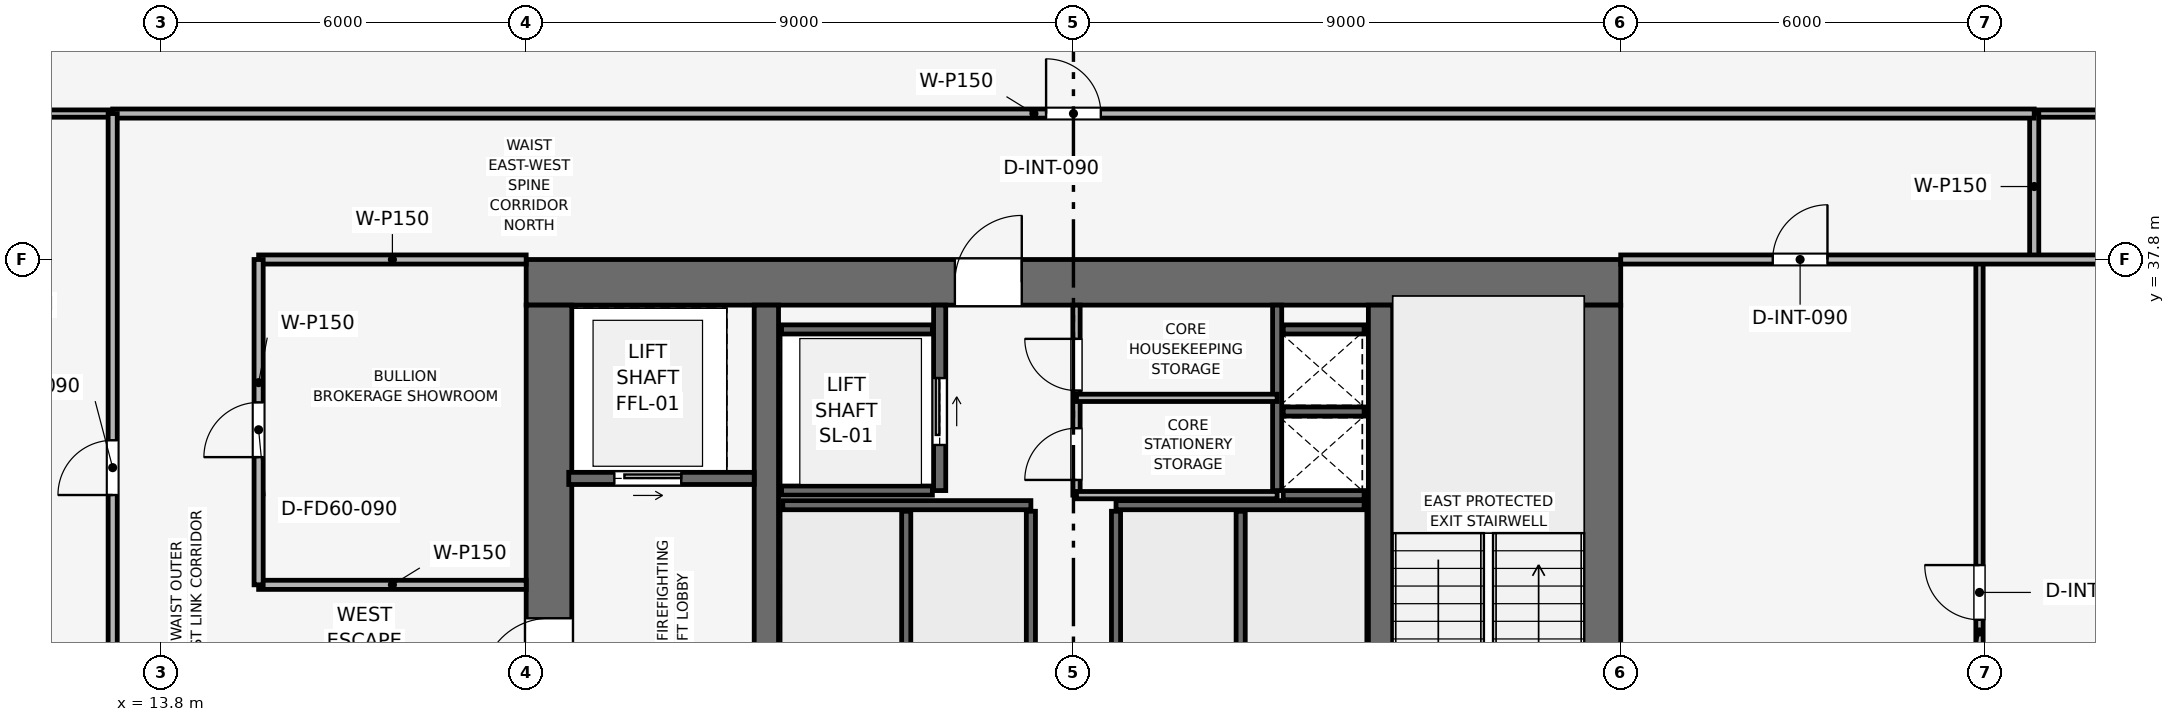
"""IFC4 building model, lengths in metres.
Left out: names, types, materials, properties, quantities, classifications, styles, units other than length and angle.
Written with IfcOpenShell. Run it as: python <this file> out.ifc"""

import sys

from ifc_helpers import new_model, si_unit, direction, frame, frame_2d, origin, place, context, subcontext, project, spatial, rectangle, extrude, element, fill, save


model = new_model("IFC4")
c1 = context("Model", 3, precision=1e-05, world=origin(), true_north=direction((0.0, 1.0)))
c2 = subcontext(c1, "Body", "Model", "MODEL_VIEW")
j1 = project(units=[si_unit("LENGTHUNIT", "METRE"), si_unit("PLANEANGLEUNIT", "RADIAN")], contexts=[c1])
p1 = place(None, origin())
s1 = spatial("IfcSite", under=j1, at=p1, CompositionType="ELEMENT")
p2 = place(p1, origin())
s2 = spatial("IfcBuilding", under=s1, at=p2, CompositionType="ELEMENT")
p3 = place(p2, frame((0.0, 0.0, 199.95)))
s3 = spatial("IfcBuildingStorey", under=s2, at=p3, CompositionType="ELEMENT", Elevation=199.95)
p4 = place(p3, frame((19.8, 37.425, 0.0), z_axis=(0.0, 0.0, 1.0), x_axis=(1.0, 0.0, 0.0)))
e1 = element("IfcWall", 1, at=p4, inside=s3, PredefinedType="SHEAR", context=c2, shape_type="SweptSolid", body=[
    extrude(rectangle(XDim=18.0, YDim=0.75, at=frame_2d((9.0, 0.0))), origin(), (0.0, 0.0, 1.0), 3.75),
])
p5 = place(p4, frame((7.05, 0.0, 0.0)))
e2 = element("IfcOpeningElement", 2, at=p5, cuts=e1, PredefinedType="OPENING", context=c2, shape_type="SweptSolid", body=[
    extrude(rectangle(XDim=1.1, YDim=2.15, at=frame_2d((0.55, 1.075))), frame((0.0, 0.385, 0.0), z_axis=(0.0, -1.0, 0.0), x_axis=(1.0, 0.0, 0.0)), (0.0, 0.0, 1.0), 0.77),
])
p6 = place(p3, frame((20.175, 20.55, 0.0), z_axis=(0.0, 0.0, 1.0), x_axis=(0.0, 1.0, 0.0)))
e3 = element("IfcWall", 3, at=p6, inside=s3, PredefinedType="SHEAR", context=c2, shape_type="SweptSolid", body=[
    extrude(rectangle(XDim=16.5, YDim=0.75, at=frame_2d((8.25, 0.0))), origin(), (0.0, 0.0, 1.0), 3.75),
])
p7 = place(p6, frame((10.25, 0.0, 0.0)))
e4 = element("IfcOpeningElement", 4, at=p7, cuts=e3, PredefinedType="OPENING", context=c2, shape_type="SweptSolid", body=[
    extrude(rectangle(XDim=1.1, YDim=2.15, at=frame_2d((0.55, 1.075))), frame((0.0, 0.385, 0.0), z_axis=(0.0, -1.0, 0.0), x_axis=(1.0, 0.0, 0.0)), (0.0, 0.0, 1.0), 0.77),
])
p8 = place(p3, frame((37.425, 20.55, 0.0), z_axis=(0.0, 0.0, 1.0), x_axis=(0.0, 1.0, 0.0)))
e5 = element("IfcWall", 5, at=p8, inside=s3, PredefinedType="SHEAR", context=c2, shape_type="SweptSolid", body=[
    extrude(rectangle(XDim=16.5, YDim=0.75, at=frame_2d((8.25, 0.0))), origin(), (0.0, 0.0, 1.0), 3.75),
])
p9 = place(p8, frame((4.75, 0.0, 0.0)))
e6 = element("IfcOpeningElement", 6, at=p9, cuts=e5, PredefinedType="OPENING", context=c2, shape_type="SweptSolid", body=[
    extrude(rectangle(XDim=1.1, YDim=2.15, at=frame_2d((0.55, 1.075))), frame((0.0, 0.385, 0.0), z_axis=(0.0, -1.0, 0.0), x_axis=(1.0, 0.0, 0.0)), (0.0, 0.0, 1.0), 0.77),
])
for number, where, z_axis, x_axis in (
    (7, (23.75, 20.55, 0.0), (0.0, 0.0, 1.0), (0.0, 1.0, 0.0)),
    (8, (33.85, 20.55, 0.0), (0.0, 0.0, 1.0), (0.0, 1.0, 0.0)),
):
    element("IfcWall", number, at=place(p3, frame(where, z_axis=z_axis, x_axis=x_axis)), inside=s3, PredefinedType="SHEAR", context=c2, shape_type="SweptSolid", body=[
        extrude(rectangle(XDim=16.5, YDim=0.4, at=frame_2d((8.25, 0.0))), origin(), (0.0, 0.0, 1.0), 3.75),
    ])
p10 = place(p3, frame((32.15, 34.0, 0.0), z_axis=(0.0, 0.0, 1.0), x_axis=(0.0, 1.0, 0.0)))
e9 = element("IfcWall", 9, at=p10, inside=s3, PredefinedType="SHEAR", context=c2, shape_type="SweptSolid", body=[
    extrude(rectangle(XDim=3.05, YDim=0.15, at=frame_2d((1.525, 0.0))), origin(), (0.0, 0.0, 1.0), 3.5),
])
for number, where, z_axis, x_axis in (
    (10, (32.25, 33.925, 0.0), (0.0, 0.0, 1.0), (1.0, 0.0, 0.0)),
    (11, (32.25, 35.3, 0.0), (0.0, 0.0, 1.0), (1.0, 0.0, 0.0)),
):
    element("IfcWall", number, at=place(p3, frame(where, z_axis=z_axis, x_axis=x_axis)), inside=s3, PredefinedType="SHEAR", context=c2, shape_type="SweptSolid", body=[
        extrude(rectangle(XDim=1.33, YDim=0.15, at=frame_2d((0.665, 0.0))), origin(), (0.0, 0.0, 1.0), 3.5),
    ])
p11 = place(p3, frame((20.5, 34.2, 0.0), z_axis=(0.0, 0.0, 1.0), x_axis=(1.0, 0.0, 0.0)))
e12 = element("IfcWall", 12, at=p11, inside=s3, PredefinedType="SHEAR", context=c2, shape_type="SweptSolid", body=[
    extrude(rectangle(XDim=3.05, YDim=0.2, at=frame_2d((1.525, 0.0))), origin(), (0.0, 0.0, 1.0), 3.5),
])
p12 = place(p11, frame((0.75, 0.0, 0.0)))
e13 = element("IfcOpeningElement", 13, at=p12, cuts=e12, PredefinedType="OPENING", context=c2, shape_type="SweptSolid", body=[
    extrude(rectangle(XDim=1.1, YDim=2.15, at=frame_2d((0.55, 1.075))), frame((0.0, 0.11, 0.0), z_axis=(0.0, -1.0, 0.0), x_axis=(1.0, 0.0, 0.0)), (0.0, 0.0, 1.0), 0.22),
])
p13 = place(p3, frame((26.6, 34.0, 0.0), z_axis=(0.0, 0.0, 1.0), x_axis=(0.0, 1.0, 0.0)))
e14 = element("IfcWall", 14, at=p13, inside=s3, PredefinedType="SHEAR", context=c2, shape_type="SweptSolid", body=[
    extrude(rectangle(XDim=3.05, YDim=0.2, at=frame_2d((1.525, 0.0))), origin(), (0.0, 0.0, 1.0), 3.5),
])
p14 = place(p13, frame((0.75, 0.0, 0.0)))
e15 = element("IfcOpeningElement", 15, at=p14, cuts=e14, PredefinedType="OPENING", context=c2, shape_type="SweptSolid", body=[
    extrude(rectangle(XDim=1.1, YDim=2.15, at=frame_2d((0.55, 1.075))), frame((0.0, 0.11, 0.0), z_axis=(0.0, -1.0, 0.0), x_axis=(1.0, 0.0, 0.0)), (0.0, 0.0, 1.0), 0.22),
])
for number, where, z_axis, x_axis in (
    (16, (24.0, 34.0, 0.0), (0.0, 0.0, 1.0), (1.0, 0.0, 0.0)),
    (17, (24.0, 36.65, 0.0), (0.0, 0.0, 1.0), (1.0, 0.0, 0.0)),
):
    element("IfcWall", number, at=place(p3, frame(where, z_axis=z_axis, x_axis=x_axis)), inside=s3, PredefinedType="SHEAR", context=c2, shape_type="SweptSolid", body=[
        extrude(rectangle(XDim=2.48, YDim=0.15, at=frame_2d((1.24, 0.0))), origin(), (0.0, 0.0, 1.0), 3.5),
    ])
p15 = place(p3, frame((32.25, 36.65, 0.0), z_axis=(0.0, 0.0, 1.0), x_axis=(1.0, 0.0, 0.0)))
e18 = element("IfcWall", 18, at=p15, inside=s3, PredefinedType="SHEAR", context=c2, shape_type="SweptSolid", body=[
    extrude(rectangle(XDim=1.33, YDim=0.15, at=frame_2d((0.665, 0.0))), origin(), (0.0, 0.0, 1.0), 3.5),
])
for number, where, z_axis, x_axis in (
    (19, (24.02, 33.76, 0.0), (0.0, 0.0, 1.0), (1.0, 0.0, 0.0)),
    (20, (29.5, 33.76, 0.0), (0.0, 0.0, 1.0), (1.0, 0.0, 0.0)),
):
    element("IfcWall", number, at=place(p3, frame(where, z_axis=z_axis, x_axis=x_axis)), inside=s3, PredefinedType="SHEAR", context=c2, shape_type="SweptSolid", body=[
        extrude(rectangle(XDim=4.08, YDim=0.15, at=frame_2d((2.04, 0.0))), origin(), (0.0, 0.0, 1.0), 3.5),
    ])
for number, where, z_axis, x_axis in (
    (21, (26.05, 31.42, 0.0), (0.0, 0.0, 1.0), (0.0, 1.0, 0.0)),
    (22, (28.1, 31.42, 0.0), (0.0, 0.0, 1.0), (0.0, 1.0, 0.0)),
    (23, (29.5, 31.42, 0.0), (0.0, 0.0, 1.0), (0.0, 1.0, 0.0)),
    (24, (31.55, 31.42, 0.0), (0.0, 0.0, 1.0), (0.0, 1.0, 0.0)),
):
    element("IfcWall", number, at=place(p3, frame(where, z_axis=z_axis, x_axis=x_axis)), inside=s3, PredefinedType="SHEAR", context=c2, shape_type="SweptSolid", body=[
        extrude(rectangle(XDim=2.24, YDim=0.15, at=frame_2d((1.12, 0.0))), origin(), (0.0, 0.0, 1.0), 3.5),
    ])
p16 = place(p3, frame((28.85, 33.925, 0.0), z_axis=(0.0, 0.0, 1.0), x_axis=(0.0, 1.0, 0.0)))
e25 = element("IfcWall", 25, at=p16, inside=s3, PredefinedType="PARTITIONING", context=c2, shape_type="SweptSolid", body=[
    extrude(rectangle(XDim=3.125, YDim=0.12, at=frame_2d((1.562, 0.0))), origin(), (0.0, 0.0, 1.0), 3.5),
])
p17 = place(p16, frame((0.25, 0.0, 0.0)))
e26 = element("IfcOpeningElement", 26, at=p17, cuts=e25, PredefinedType="OPENING", context=c2, shape_type="SweptSolid", body=[
    extrude(rectangle(XDim=0.85, YDim=2.1, at=frame_2d((0.425, 1.05))), frame((0.0, 0.07, 0.0), z_axis=(0.0, -1.0, 0.0), x_axis=(1.0, 0.0, 0.0)), (0.0, 0.0, 1.0), 0.14),
])
p18 = place(p16, frame((1.72, 0.0, 0.0)))
e27 = element("IfcOpeningElement", 27, at=p18, cuts=e25, PredefinedType="OPENING", context=c2, shape_type="SweptSolid", body=[
    extrude(rectangle(XDim=0.85, YDim=2.1, at=frame_2d((0.425, 1.05))), frame((0.0, 0.07, 0.0), z_axis=(0.0, -1.0, 0.0), x_axis=(1.0, 0.0, 0.0)), (0.0, 0.0, 1.0), 0.14),
])
for number, where, z_axis, x_axis in (
    (28, (28.85, 35.525, 0.0), (0.0, 0.0, 1.0), (1.0, 0.0, 0.0)),
    (29, (28.85, 33.925, 0.0), (0.0, 0.0, 1.0), (1.0, 0.0, 0.0)),
):
    element("IfcWall", number, at=place(p3, frame(where, z_axis=z_axis, x_axis=x_axis)), inside=s3, PredefinedType="PARTITIONING", context=c2, shape_type="SweptSolid", body=[
        extrude(rectangle(XDim=3.3, YDim=0.12, at=frame_2d((1.65, 0.0))), origin(), (0.0, 0.0, 1.0), 3.5),
    ])
p19 = place(p3, frame((15.4, 32.45, 0.0), z_axis=(0.0, 0.0, 1.0), x_axis=(1.0, 0.0, 0.0)))
e30 = element("IfcWall", 30, at=p19, inside=s3, PredefinedType="PARTITIONING", context=c2, shape_type="SweptSolid", body=[
    extrude(rectangle(XDim=4.4, YDim=0.15, at=frame_2d((2.2, 0.0))), origin(), (0.0, 0.0, 1.0), 3.5),
])
p20 = place(p3, frame((15.4, 37.8, 0.0), z_axis=(0.0, 0.0, 1.0), x_axis=(1.0, 0.0, 0.0)))
e31 = element("IfcWall", 31, at=p20, inside=s3, PredefinedType="PARTITIONING", context=c2, shape_type="SweptSolid", body=[
    extrude(rectangle(XDim=4.4, YDim=0.15, at=frame_2d((2.2, 0.0))), origin(), (0.0, 0.0, 1.0), 3.035),
])
p21 = place(p3, frame((15.4, 32.45, 0.0), z_axis=(0.0, 0.0, 1.0), x_axis=(0.0, 1.0, 0.0)))
e32 = element("IfcWall", 32, at=p21, inside=s3, PredefinedType="PARTITIONING", context=c2, shape_type="SweptSolid", body=[
    extrude(rectangle(XDim=5.35, YDim=0.15, at=frame_2d((2.675, 0.0))), origin(), (0.0, 0.0, 1.0), 3.035),
])
p22 = place(p21, frame((2.1, 0.0, 0.0)))
e33 = element("IfcOpeningElement", 33, at=p22, cuts=e32, PredefinedType="OPENING", context=c2, shape_type="SweptSolid", body=[
    extrude(rectangle(XDim=0.9, YDim=2.1, at=frame_2d((0.45, 1.05))), frame((0.0, 0.085, 0.0), z_axis=(0.0, -1.0, 0.0), x_axis=(1.0, 0.0, 0.0)), (0.0, 0.0, 1.0), 0.17),
])
p23 = place(p3, frame((43.7, 26.85, 0.0), z_axis=(0.0, 0.0, 1.0), x_axis=(0.0, 1.0, 0.0)))
e34 = element("IfcWall", 34, at=p23, inside=s3, PredefinedType="PARTITIONING", context=c2, shape_type="SweptSolid", body=[
    extrude(rectangle(XDim=10.95, YDim=0.12, at=frame_2d((5.475, 0.0))), origin(), (0.0, 0.0, 1.0), 3.035),
])
p24 = place(p23, frame((5.025, 0.0, 0.0)))
e35 = element("IfcOpeningElement", 35, at=p24, cuts=e34, PredefinedType="OPENING", context=c2, shape_type="SweptSolid", body=[
    extrude(rectangle(XDim=0.9, YDim=2.1, at=frame_2d((0.45, 1.05))), frame((0.0, 0.07, 0.0), z_axis=(0.0, -1.0, 0.0), x_axis=(1.0, 0.0, 0.0)), (0.0, 0.0, 1.0), 0.14),
])
p25 = place(p3, frame((1.93, 40.2, 0.0), z_axis=(0.0, 0.0, 1.0), x_axis=(1.0, 0.0, 0.0)))
e36 = element("IfcWall", 36, at=p25, inside=s3, PredefinedType="PARTITIONING", context=c2, shape_type="SweptSolid", body=[
    extrude(rectangle(XDim=11.07, YDim=0.12, at=frame_2d((5.535, 0.0))), origin(), (0.0, 0.0, 1.0), 2.885),
])
p26 = place(p3, frame((44.6, 40.2, 0.0), z_axis=(0.0, 0.0, 1.0), x_axis=(1.0, 0.0, 0.0)))
e37 = element("IfcWall", 37, at=p26, inside=s3, PredefinedType="PARTITIONING", context=c2, shape_type="SweptSolid", body=[
    extrude(rectangle(XDim=11.07, YDim=0.12, at=frame_2d((5.535, 0.0))), origin(), (0.0, 0.0, 1.0), 2.885),
])
p27 = place(p3, frame((44.6, 37.8, 0.0), z_axis=(0.0, 0.0, 1.0), x_axis=(0.0, 1.0, 0.0)))
e38 = element("IfcWall", 38, at=p27, inside=s3, PredefinedType="PARTITIONING", context=c2, shape_type="SweptSolid", body=[
    extrude(rectangle(XDim=2.4, YDim=0.15, at=frame_2d((1.2, 0.0))), origin(), (0.0, 0.0, 1.0), 3.5),
])
p28 = place(p3, frame((37.8, 37.8, 0.0), z_axis=(0.0, 0.0, 1.0), x_axis=(1.0, 0.0, 0.0)))
e39 = element("IfcWall", 39, at=p28, inside=s3, PredefinedType="PARTITIONING", context=c2, shape_type="SweptSolid", body=[
    extrude(rectangle(XDim=17.87, YDim=0.15, at=frame_2d((8.935, 0.0))), origin(), (0.0, 0.0, 1.0), 2.885),
])
p29 = place(p28, frame((2.5, 0.0, 0.0)))
e40 = element("IfcOpeningElement", 40, at=p29, cuts=e39, PredefinedType="OPENING", context=c2, shape_type="SweptSolid", body=[
    extrude(rectangle(XDim=0.9, YDim=2.1, at=frame_2d((0.45, 1.05))), frame((0.0, 0.085, 0.0), z_axis=(0.0, -1.0, 0.0), x_axis=(1.0, 0.0, 0.0)), (0.0, 0.0, 1.0), 0.17),
])
p30 = place(p3, frame((13.0, 40.2, 0.0), z_axis=(0.0, 0.0, 1.0), x_axis=(1.0, 0.0, 0.0)))
e41 = element("IfcWall", 41, at=p30, inside=s3, PredefinedType="PARTITIONING", context=c2, shape_type="SweptSolid", body=[
    extrude(rectangle(XDim=31.6, YDim=0.15, at=frame_2d((15.8, 0.0))), origin(), (0.0, 0.0, 1.0), 3.035),
])
p31 = place(p30, frame((15.35, 0.0, 0.0)))
e42 = element("IfcOpeningElement", 42, at=p31, cuts=e41, PredefinedType="OPENING", context=c2, shape_type="SweptSolid", body=[
    extrude(rectangle(XDim=0.9, YDim=2.1, at=frame_2d((0.45, 1.05))), frame((0.0, 0.085, 0.0), z_axis=(0.0, -1.0, 0.0), x_axis=(1.0, 0.0, 0.0)), (0.0, 0.0, 1.0), 0.17),
])
p32 = place(p3, frame((13.0, 17.4, 0.0), z_axis=(0.0, 0.0, 1.0), x_axis=(0.0, 1.0, 0.0)))
e43 = element("IfcWall", 43, at=p32, inside=s3, PredefinedType="PARTITIONING", context=c2, shape_type="SweptSolid", body=[
    extrude(rectangle(XDim=22.8, YDim=0.15, at=frame_2d((11.4, 0.0))), origin(), (0.0, 0.0, 1.0), 3.035),
])
p33 = place(p32, frame((3.1, 0.0, 0.0)))
e44 = element("IfcOpeningElement", 44, at=p33, cuts=e43, PredefinedType="OPENING", context=c2, shape_type="SweptSolid", body=[
    extrude(rectangle(XDim=0.9, YDim=2.1, at=frame_2d((0.45, 1.05))), frame((0.0, 0.085, 0.0), z_axis=(0.0, -1.0, 0.0), x_axis=(1.0, 0.0, 0.0)), (0.0, 0.0, 1.0), 0.17),
])
p34 = place(p32, frame((6.529, 0.0, 0.0)))
e45 = element("IfcOpeningElement", 45, at=p34, cuts=e43, PredefinedType="OPENING", context=c2, shape_type="SweptSolid", body=[
    extrude(rectangle(XDim=0.9, YDim=2.1, at=frame_2d((0.45, 1.05))), frame((0.0, 0.085, 0.0), z_axis=(0.0, -1.0, 0.0), x_axis=(1.0, 0.0, 0.0)), (0.0, 0.0, 1.0), 0.17),
])
p35 = place(p32, frame((10.957, 0.0, 0.0)))
e46 = element("IfcOpeningElement", 46, at=p35, cuts=e43, PredefinedType="OPENING", context=c2, shape_type="SweptSolid", body=[
    extrude(rectangle(XDim=0.9, YDim=2.1, at=frame_2d((0.45, 1.05))), frame((0.0, 0.085, 0.0), z_axis=(0.0, -1.0, 0.0), x_axis=(1.0, 0.0, 0.0)), (0.0, 0.0, 1.0), 0.17),
])
p36 = place(p32, frame((16.527, 0.0, 0.0)))
e47 = element("IfcOpeningElement", 47, at=p36, cuts=e43, PredefinedType="OPENING", context=c2, shape_type="SweptSolid", body=[
    extrude(rectangle(XDim=0.9, YDim=2.1, at=frame_2d((0.45, 1.05))), frame((0.0, 0.085, 0.0), z_axis=(0.0, -1.0, 0.0), x_axis=(1.0, 0.0, 0.0)), (0.0, 0.0, 1.0), 0.17),
])
p37 = place(p12, origin())
e48 = element("IfcDoor", 48, at=p37, inside=s3, OperationType="SLIDING_TO_RIGHT", PredefinedType="DOOR", context=c2, shape_type="SweptSolid", body=[
    extrude(rectangle(XDim=1.1, YDim=2.15, at=frame_2d((0.55, 1.075))), frame((0.0, 0.025, 0.0), z_axis=(0.0, -1.0, 0.0), x_axis=(1.0, 0.0, 0.0)), (0.0, 0.0, 1.0), 0.05),
])
fill(e13, e48)
p38 = place(p14, origin())
e49 = element("IfcDoor", 49, at=p38, inside=s3, OperationType="SLIDING_TO_RIGHT", PredefinedType="DOOR", context=c2, shape_type="SweptSolid", body=[
    extrude(rectangle(XDim=1.1, YDim=2.15, at=frame_2d((0.55, 1.075))), frame((0.0, 0.025, 0.0), z_axis=(0.0, -1.0, 0.0), x_axis=(1.0, 0.0, 0.0)), (0.0, 0.0, 1.0), 0.05),
])
fill(e15, e49)
p39 = place(p17, origin())
e50 = element("IfcDoor", 50, at=p39, inside=s3, OperationType="SINGLE_SWING_LEFT", PredefinedType="DOOR", context=c2, shape_type="SweptSolid", body=[
    extrude(rectangle(XDim=0.85, YDim=2.1, at=frame_2d((0.425, 1.05))), frame((0.0, 0.025, 0.0), z_axis=(0.0, -1.0, 0.0), x_axis=(1.0, 0.0, 0.0)), (0.0, 0.0, 1.0), 0.05),
])
fill(e26, e50)
p40 = place(p18, origin())
e51 = element("IfcDoor", 51, at=p40, inside=s3, OperationType="SINGLE_SWING_RIGHT", PredefinedType="DOOR", context=c2, shape_type="SweptSolid", body=[
    extrude(rectangle(XDim=0.85, YDim=2.1, at=frame_2d((0.425, 1.05))), frame((0.0, 0.025, 0.0), z_axis=(0.0, -1.0, 0.0), x_axis=(1.0, 0.0, 0.0)), (0.0, 0.0, 1.0), 0.05),
])
fill(e27, e51)
p41 = place(p22, origin())
e52 = element("IfcDoor", 52, at=p41, inside=s3, OperationType="SINGLE_SWING_LEFT", PredefinedType="DOOR", context=c2, shape_type="SweptSolid", body=[
    extrude(rectangle(XDim=0.9, YDim=2.1, at=frame_2d((0.45, 1.05))), frame((0.0, 0.025, 0.0), z_axis=(0.0, -1.0, 0.0), x_axis=(1.0, 0.0, 0.0)), (0.0, 0.0, 1.0), 0.05),
])
fill(e33, e52)
p42 = place(p24, origin())
e53 = element("IfcDoor", 53, at=p42, inside=s3, OperationType="SINGLE_SWING_RIGHT", PredefinedType="DOOR", context=c2, shape_type="SweptSolid", body=[
    extrude(rectangle(XDim=0.9, YDim=2.1, at=frame_2d((0.45, 1.05))), frame((0.0, 0.025, 0.0), z_axis=(0.0, -1.0, 0.0), x_axis=(1.0, 0.0, 0.0)), (0.0, 0.0, 1.0), 0.05),
])
fill(e35, e53)
p43 = place(p29, origin())
e54 = element("IfcDoor", 54, at=p43, inside=s3, OperationType="SINGLE_SWING_RIGHT", PredefinedType="DOOR", context=c2, shape_type="SweptSolid", body=[
    extrude(rectangle(XDim=0.9, YDim=2.1, at=frame_2d((0.45, 1.05))), frame((0.0, 0.025, 0.0), z_axis=(0.0, -1.0, 0.0), x_axis=(1.0, 0.0, 0.0)), (0.0, 0.0, 1.0), 0.05),
])
fill(e40, e54)
p44 = place(p31, origin())
e55 = element("IfcDoor", 55, at=p44, inside=s3, OperationType="SINGLE_SWING_LEFT", PredefinedType="DOOR", context=c2, shape_type="SweptSolid", body=[
    extrude(rectangle(XDim=0.9, YDim=2.1, at=frame_2d((0.45, 1.05))), frame((0.0, 0.025, 0.0), z_axis=(0.0, -1.0, 0.0), x_axis=(1.0, 0.0, 0.0)), (0.0, 0.0, 1.0), 0.05),
])
fill(e42, e55)
p45 = place(p36, origin())
e56 = element("IfcDoor", 56, at=p45, inside=s3, OperationType="SINGLE_SWING_LEFT", PredefinedType="DOOR", context=c2, shape_type="SweptSolid", body=[
    extrude(rectangle(XDim=0.9, YDim=2.1, at=frame_2d((0.45, 1.05))), frame((0.0, 0.025, 0.0), z_axis=(0.0, -1.0, 0.0), x_axis=(1.0, 0.0, 0.0)), (0.0, 0.0, 1.0), 0.05),
])
fill(e47, e56)
p46 = place(p7, origin())
e57 = element("IfcDoor", 57, at=p46, inside=s3, OperationType="SINGLE_SWING_LEFT", PredefinedType="DOOR", context=c2, shape_type="SweptSolid", body=[
    extrude(rectangle(XDim=1.1, YDim=2.15, at=frame_2d((0.55, 1.075))), frame((0.0, 0.025, 0.0), z_axis=(0.0, -1.0, 0.0), x_axis=(1.0, 0.0, 0.0)), (0.0, 0.0, 1.0), 0.05),
])
fill(e4, e57)
p47 = place(p5, origin())
e58 = element("IfcDoor", 58, at=p47, inside=s3, OperationType="SINGLE_SWING_RIGHT", PredefinedType="DOOR", context=c2, shape_type="SweptSolid", body=[
    extrude(rectangle(XDim=1.1, YDim=2.15, at=frame_2d((0.55, 1.075))), frame((0.0, 0.025, 0.0), z_axis=(0.0, -1.0, 0.0), x_axis=(1.0, 0.0, 0.0)), (0.0, 0.0, 1.0), 0.05),
])
fill(e2, e58)
save(model, sys.argv[1])
